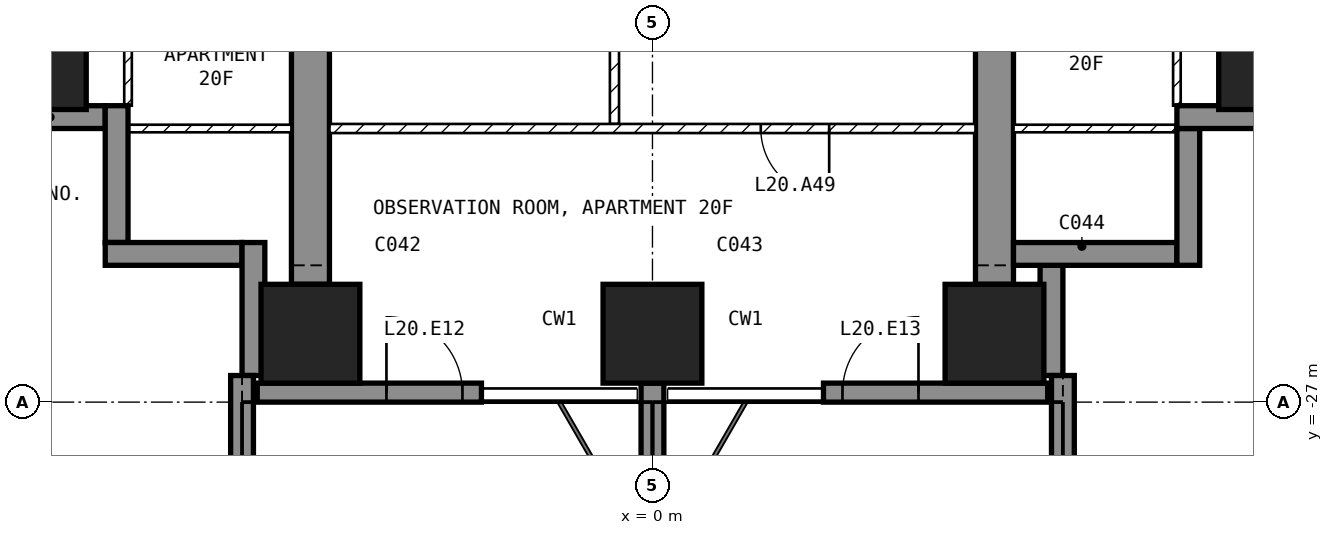
"""IFC4 building model, lengths in metres.
Left out: names, types, materials, properties, quantities, classifications, styles, units other than length and angle.
Written with IfcOpenShell. Run it as: python <this file> out.ifc"""

import sys

from ifc_helpers import new_model, si_unit, direction, frame, frame_2d, origin, origin_2d, place, context, subcontext, project, spatial, polyline, rectangle, outline, extrude, element, fill, save


model = new_model("IFC4")
c1 = context("Model", 3, precision=1e-05, world=origin(), true_north=direction((0.0, 1.0)))
c2 = subcontext(c1, "Body", "Model", "MODEL_VIEW")
j1 = project(units=[si_unit("LENGTHUNIT", "METRE"), si_unit("PLANEANGLEUNIT", "RADIAN")], contexts=[c1])
p1 = place(None, origin())
s1 = spatial("IfcSite", under=j1, at=p1, CompositionType="ELEMENT")
p2 = place(p1, origin())
s2 = spatial("IfcBuilding", under=s1, at=p2, CompositionType="ELEMENT")
p3 = place(p2, frame((0.0, 0.0, 89.0)))
s3 = spatial("IfcBuildingStorey", under=s2, at=p3, CompositionType="ELEMENT", Elevation=89.0)
for number, where, z_axis, x_axis in (
    (1, (-8.1, -22.5, -0.25), (0.0, 0.0, 1.0), (1.0, 0.0, 0.0)),
    (2, (-4.5, -26.1, -0.25), (0.0, 0.0, 1.0), (1.0, 0.0, 0.0)),
    (3, (0.0, -26.1, -0.25), (0.0, 0.0, 1.0), (1.0, 0.0, 0.0)),
    (4, (4.5, -26.1, -0.25), (0.0, 0.0, 1.0), (1.0, 0.0, 0.0)),
    (5, (8.1, -22.5, -0.25), (0.0, 0.0, 1.0), (1.0, 0.0, 0.0)),
):
    element("IfcColumn", number, at=place(p3, frame(where, z_axis=z_axis, x_axis=x_axis)), inside=s3, PredefinedType="COLUMN", context=c2, shape_type="SweptSolid", body=[
        extrude(rectangle(XDim=1.3, YDim=1.3, at=origin_2d()), origin(), (0.0, 0.0, 1.0), 3.45),
    ])
for number, where, z_axis, x_axis in (
    (6, (-4.75, -25.45, -0.25), (1.0, 0.0, 0.0), (0.0, 1.0, 0.0)),
    (7, (4.25, -25.45, -0.25), (1.0, 0.0, 0.0), (0.0, 1.0, 0.0)),
):
    element("IfcWall", number, at=place(p3, frame(where, z_axis=z_axis, x_axis=x_axis)), inside=s3, PredefinedType="SHEAR", context=c2, shape_type="SweptSolid", body=[
        extrude(outline(polyline([(0.0, 0.0), (4.15, 0.0), (4.15, 2.65), (6.55, 2.65), (6.55, 0.0), (11.95, 0.0), (11.95, 2.65), (14.35, 2.65), (14.35, 0.0), (16.45, 0.0), (16.45, 3.45), (0.0, 3.45), (0.0, 0.0)])), origin(), (0.0, 0.0, 1.0), 0.5),
    ])
p4 = place(p3, frame((-5.2, -26.875, 0.0), z_axis=(0.0, 0.0, 1.0), x_axis=(1.0, 0.0, 0.0)))
e8 = element("IfcWall", 8, at=p4, inside=s3, PredefinedType="SOLIDWALL", context=c2, shape_type="SweptSolid", body=[
    extrude(rectangle(XDim=2.95, YDim=0.25, at=frame_2d((1.475, 0.0))), origin(), (0.0, 0.0, 1.0), 3.2),
])
p5 = place(p4, frame((1.7, 0.0, 0.0)))
e9 = element("IfcOpeningElement", 9, at=p5, cuts=e8, PredefinedType="OPENING", context=c2, shape_type="SweptSolid", body=[
    extrude(rectangle(XDim=1.0, YDim=2.4, at=frame_2d((0.5, 1.2))), frame((0.0, 0.135, 0.0), z_axis=(0.0, -1.0, 0.0), x_axis=(1.0, 0.0, 0.0)), (0.0, 0.0, 1.0), 0.27),
])
p6 = place(p3, frame((2.25, -26.875, 0.0), z_axis=(0.0, 0.0, 1.0), x_axis=(1.0, 0.0, 0.0)))
e10 = element("IfcWall", 10, at=p6, inside=s3, PredefinedType="SOLIDWALL", context=c2, shape_type="SweptSolid", body=[
    extrude(rectangle(XDim=2.95, YDim=0.25, at=frame_2d((1.475, 0.0))), origin(), (0.0, 0.0, 1.0), 3.2),
])
p7 = place(p6, frame((0.25, 0.0, 0.0)))
e11 = element("IfcOpeningElement", 11, at=p7, cuts=e10, PredefinedType="OPENING", context=c2, shape_type="SweptSolid", body=[
    extrude(rectangle(XDim=1.0, YDim=2.4, at=frame_2d((0.5, 1.2))), frame((0.0, 0.135, 0.0), z_axis=(0.0, -1.0, 0.0), x_axis=(1.0, 0.0, 0.0)), (0.0, 0.0, 1.0), 0.27),
])
p8 = place(p3, frame((5.25, -26.65, 0.0), z_axis=(0.0, 0.0, 1.0), x_axis=(0.0, 1.0, 0.0)))
e12 = element("IfcWall", 12, at=p8, inside=s3, PredefinedType="SOLIDWALL", context=c2, shape_type="SweptSolid", body=[
    extrude(rectangle(XDim=1.45, YDim=0.3, at=frame_2d((0.725, 0.0))), origin(), (0.0, 0.0, 1.0), 3.2),
])
p9 = place(p3, frame((4.75, -25.05, 0.0), z_axis=(0.0, 0.0, 1.0), x_axis=(1.0, 0.0, 0.0)))
e13 = element("IfcWall", 13, at=p9, inside=s3, PredefinedType="SOLIDWALL", context=c2, shape_type="SweptSolid", body=[
    extrude(rectangle(XDim=2.15, YDim=0.3, at=frame_2d((1.075, 0.0))), origin(), (0.0, 0.0, 1.0), 3.2),
])
p10 = place(p3, frame((7.05, -25.2, 0.0), z_axis=(0.0, 0.0, 1.0), x_axis=(0.0, 1.0, 0.0)))
e14 = element("IfcWall", 14, at=p10, inside=s3, PredefinedType="SOLIDWALL", context=c2, shape_type="SweptSolid", body=[
    extrude(rectangle(XDim=1.8, YDim=0.3, at=frame_2d((0.9, 0.0))), origin(), (0.0, 0.0, 1.0), 3.2),
])
p11 = place(p3, frame((6.9, -23.25, 0.0), z_axis=(0.0, 0.0, 1.0), x_axis=(1.0, 0.0, 0.0)))
e15 = element("IfcWall", 15, at=p11, inside=s3, PredefinedType="SOLIDWALL", context=c2, shape_type="SweptSolid", body=[
    extrude(rectangle(XDim=1.75, YDim=0.3, at=frame_2d((0.875, 0.0))), origin(), (0.0, 0.0, 1.0), 3.2),
])
p12 = place(p3, frame((-8.65, -23.25, 0.0), z_axis=(0.0, 0.0, 1.0), x_axis=(1.0, 0.0, 0.0)))
e16 = element("IfcWall", 16, at=p12, inside=s3, PredefinedType="SOLIDWALL", context=c2, shape_type="SweptSolid", body=[
    extrude(rectangle(XDim=1.45, YDim=0.3, at=frame_2d((0.725, 0.0))), origin(), (0.0, 0.0, 1.0), 3.2),
])
p13 = place(p3, frame((-7.05, -23.1, 0.0), z_axis=(0.0, 0.0, 1.0), x_axis=(0.0, -1.0, 0.0)))
e17 = element("IfcWall", 17, at=p13, inside=s3, PredefinedType="SOLIDWALL", context=c2, shape_type="SweptSolid", body=[
    extrude(rectangle(XDim=1.8, YDim=0.3, at=frame_2d((0.9, 0.0))), origin(), (0.0, 0.0, 1.0), 3.2),
])
p14 = place(p3, frame((-7.2, -25.05, 0.0), z_axis=(0.0, 0.0, 1.0), x_axis=(1.0, 0.0, 0.0)))
e18 = element("IfcWall", 18, at=p14, inside=s3, PredefinedType="SOLIDWALL", context=c2, shape_type="SweptSolid", body=[
    extrude(rectangle(XDim=1.8, YDim=0.3, at=frame_2d((0.9, 0.0))), origin(), (0.0, 0.0, 1.0), 3.2),
])
p15 = place(p3, frame((-5.25, -24.9, 0.0), z_axis=(0.0, 0.0, 1.0), x_axis=(0.0, -1.0, 0.0)))
e19 = element("IfcWall", 19, at=p15, inside=s3, PredefinedType="SOLIDWALL", context=c2, shape_type="SweptSolid", body=[
    extrude(rectangle(XDim=1.75, YDim=0.3, at=frame_2d((0.875, 0.0))), origin(), (0.0, 0.0, 1.0), 3.2),
])
p16 = place(p3, frame((-5.4, -26.65, 0.0), z_axis=(0.0, 0.0, 1.0), x_axis=(0.0, -1.0, 0.0)))
e20 = element("IfcWall", 20, at=p16, inside=s3, PredefinedType="SOLIDWALL", context=c2, shape_type="SweptSolid", body=[
    extrude(rectangle(XDim=3.05, YDim=0.3, at=frame_2d((1.525, 0.0))), origin(), (0.0, 0.0, 1.0), 3.2),
])
p17 = place(p3, frame((0.0, -26.75, 0.0), z_axis=(0.0, 0.0, 1.0), x_axis=(0.0, -1.0, 0.0)))
e21 = element("IfcWall", 21, at=p17, inside=s3, PredefinedType="SOLIDWALL", context=c2, shape_type="SweptSolid", body=[
    extrude(rectangle(XDim=2.95, YDim=0.3, at=frame_2d((1.475, 0.0))), origin(), (0.0, 0.0, 1.0), 3.2),
])
p18 = place(p3, frame((5.4, -26.65, 0.0), z_axis=(0.0, 0.0, 1.0), x_axis=(0.0, -1.0, 0.0)))
e22 = element("IfcWall", 22, at=p18, inside=s3, PredefinedType="SOLIDWALL", context=c2, shape_type="SweptSolid", body=[
    extrude(rectangle(XDim=3.05, YDim=0.3, at=frame_2d((1.525, 0.0))), origin(), (0.0, 0.0, 1.0), 3.2),
])
p19 = place(p3, frame((-0.5, -23.34, 0.0), z_axis=(0.0, 0.0, 1.0), x_axis=(0.0, 1.0, 0.0)))
e23 = element("IfcWall", 23, at=p19, inside=s3, PredefinedType="PARTITIONING", context=c2, shape_type="SweptSolid", body=[
    extrude(rectangle(XDim=4.38, YDim=0.12, at=frame_2d((2.19, 0.0))), origin(), (0.0, 0.0, 1.0), 3.2),
])
p20 = place(p19, frame((1.74, 0.0, 0.0)))
e24 = element("IfcOpeningElement", 24, at=p20, cuts=e23, PredefinedType="OPENING", context=c2, shape_type="SweptSolid", body=[
    extrude(rectangle(XDim=0.9, YDim=2.1, at=frame_2d((0.45, 1.05))), frame((0.0, 0.07, 0.0), z_axis=(0.0, -1.0, 0.0), x_axis=(1.0, 0.0, 0.0)), (0.0, 0.0, 1.0), 0.14),
])
p21 = place(p3, frame((4.25, -23.4, 0.0), z_axis=(0.0, 0.0, 1.0), x_axis=(-1.0, 0.0, 0.0)))
e25 = element("IfcWall", 25, at=p21, inside=s3, PredefinedType="PARTITIONING", context=c2, shape_type="SweptSolid", body=[
    extrude(rectangle(XDim=8.5, YDim=0.12, at=frame_2d((4.25, 0.0))), origin(), (0.0, 0.0, 1.0), 3.2),
])
p22 = place(p21, frame((1.925, 0.0, 0.0)))
e26 = element("IfcOpeningElement", 26, at=p22, cuts=e25, PredefinedType="OPENING", context=c2, shape_type="SweptSolid", body=[
    extrude(rectangle(XDim=0.9, YDim=2.1, at=frame_2d((0.45, 1.05))), frame((0.0, 0.07, 0.0), z_axis=(0.0, -1.0, 0.0), x_axis=(1.0, 0.0, 0.0)), (0.0, 0.0, 1.0), 0.14),
])
p23 = place(p3, frame((6.9, -23.1, 0.0), z_axis=(0.0, 0.0, 1.0), x_axis=(0.0, 1.0, 0.0)))
e27 = element("IfcWall", 27, at=p23, inside=s3, PredefinedType="PARTITIONING", context=c2, shape_type="SweptSolid", body=[
    extrude(rectangle(XDim=2.65, YDim=0.1, at=frame_2d((1.325, 0.0))), origin(), (0.0, 0.0, 1.0), 3.2),
])
p24 = place(p3, frame((7.12, -23.4, 0.0), z_axis=(0.0, 0.0, 1.0), x_axis=(-1.0, 0.0, 0.0)))
e28 = element("IfcWall", 28, at=p24, inside=s3, PredefinedType="PARTITIONING", context=c2, shape_type="SweptSolid", body=[
    extrude(rectangle(XDim=2.37, YDim=0.1, at=frame_2d((1.185, 0.0))), origin(), (0.0, 0.0, 1.0), 3.2),
])
p25 = place(p3, frame((-6.9, -20.45, 0.0), z_axis=(0.0, 0.0, 1.0), x_axis=(0.0, -1.0, 0.0)))
e29 = element("IfcWall", 29, at=p25, inside=s3, PredefinedType="PARTITIONING", context=c2, shape_type="SweptSolid", body=[
    extrude(rectangle(XDim=2.65, YDim=0.1, at=frame_2d((1.325, 0.0))), origin(), (0.0, 0.0, 1.0), 3.2),
])
p26 = place(p3, frame((-4.75, -23.4, 0.0), z_axis=(0.0, 0.0, 1.0), x_axis=(-1.0, 0.0, 0.0)))
e30 = element("IfcWall", 30, at=p26, inside=s3, PredefinedType="PARTITIONING", context=c2, shape_type="SweptSolid", body=[
    extrude(rectangle(XDim=2.37, YDim=0.1, at=frame_2d((1.185, 0.0))), origin(), (0.0, 0.0, 1.0), 3.2),
])
p27 = place(p5, origin())
e31 = element("IfcDoor", 31, at=p27, inside=s3, OperationType="SINGLE_SWING_LEFT", PredefinedType="DOOR", context=c2, shape_type="SweptSolid", body=[
    extrude(rectangle(XDim=1.0, YDim=2.4, at=frame_2d((0.5, 1.2))), frame((0.0, 0.025, 0.0), z_axis=(0.0, -1.0, 0.0), x_axis=(1.0, 0.0, 0.0)), (0.0, 0.0, 1.0), 0.05),
])
fill(e9, e31)
p28 = place(p7, origin())
e32 = element("IfcDoor", 32, at=p28, inside=s3, OperationType="SINGLE_SWING_RIGHT", PredefinedType="DOOR", context=c2, shape_type="SweptSolid", body=[
    extrude(rectangle(XDim=1.0, YDim=2.4, at=frame_2d((0.5, 1.2))), frame((0.0, 0.025, 0.0), z_axis=(0.0, -1.0, 0.0), x_axis=(1.0, 0.0, 0.0)), (0.0, 0.0, 1.0), 0.05),
])
fill(e11, e32)
p29 = place(p22, origin())
e33 = element("IfcDoor", 33, at=p29, inside=s3, OperationType="SINGLE_SWING_LEFT", PredefinedType="DOOR", context=c2, shape_type="SweptSolid", body=[
    extrude(rectangle(XDim=0.9, YDim=2.1, at=frame_2d((0.45, 1.05))), frame((0.0, 0.025, 0.0), z_axis=(0.0, -1.0, 0.0), x_axis=(1.0, 0.0, 0.0)), (0.0, 0.0, 1.0), 0.05),
])
fill(e26, e33)
save(model, sys.argv[1])
